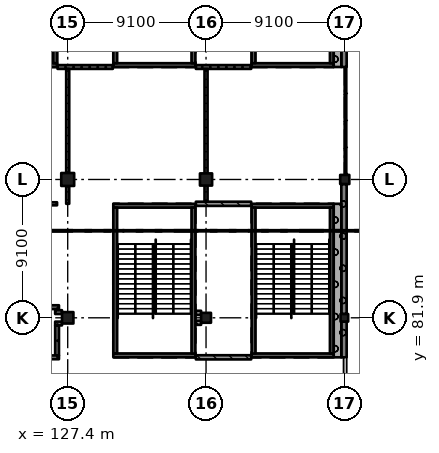
"""IFC4 building model, lengths in metres.
Left out: names, types, materials, properties, quantities, classifications, styles, units other than length and angle.
Written with IfcOpenShell. Run it as: python <this file> out.ifc"""

import sys

from ifc_helpers import new_model, si_unit, direction, frame, frame_2d, origin, origin_2d, place, context, subcontext, project, spatial, rectangle, extrude, element, fill, save


model = new_model("IFC4")
c1 = context("Model", 3, precision=1e-05, world=origin(), true_north=direction((0.0, 1.0)))
c2 = subcontext(c1, "Body", "Model", "MODEL_VIEW")
j1 = project(units=[si_unit("LENGTHUNIT", "METRE"), si_unit("PLANEANGLEUNIT", "RADIAN")], contexts=[c1])
p1 = place(None, origin())
s1 = spatial("IfcSite", under=j1, at=p1, CompositionType="ELEMENT")
p2 = place(p1, origin())
s2 = spatial("IfcBuilding", under=s1, at=p2, CompositionType="ELEMENT")
p3 = place(p2, frame((0.0, 0.0, 6.37)))
s3 = spatial("IfcBuildingStorey", under=s2, at=p3, CompositionType="ELEMENT", Elevation=6.37)
p4 = place(p3, frame((127.4, 81.9, 0.0), z_axis=(0.0, 0.0, 1.0), x_axis=(1.0, 0.0, 0.0)))
e1 = element("IfcColumn", 1, at=p4, inside=s3, PredefinedType="COLUMN", context=c2, shape_type="SweptSolid", body=[
    extrude(rectangle(XDim=0.75, YDim=0.75, at=origin_2d()), origin(), (0.0, 0.0, 1.0), 4.55),
])
p5 = place(p3, frame((127.4, 91.0, 0.0), z_axis=(0.0, 0.0, 1.0), x_axis=(1.0, 0.0, 0.0)))
e2 = element("IfcColumn", 2, at=p5, inside=s3, PredefinedType="COLUMN", context=c2, shape_type="SweptSolid", body=[
    extrude(rectangle(XDim=0.85, YDim=0.85, at=origin_2d()), origin(), (0.0, 0.0, 1.0), 4.55),
])
p6 = place(p3, frame((136.5, 81.9, 0.0), z_axis=(0.0, 0.0, 1.0), x_axis=(1.0, 0.0, 0.0)))
e3 = element("IfcColumn", 3, at=p6, inside=s3, PredefinedType="COLUMN", context=c2, shape_type="SweptSolid", body=[
    extrude(rectangle(XDim=0.65, YDim=0.65, at=origin_2d()), origin(), (0.0, 0.0, 1.0), 4.55),
])
p7 = place(p3, frame((136.5, 91.0, 0.0), z_axis=(0.0, 0.0, 1.0), x_axis=(1.0, 0.0, 0.0)))
e4 = element("IfcColumn", 4, at=p7, inside=s3, PredefinedType="COLUMN", context=c2, shape_type="SweptSolid", body=[
    extrude(rectangle(XDim=0.8, YDim=0.8, at=origin_2d()), origin(), (0.0, 0.0, 1.0), 4.55),
])
p8 = place(p3, frame((145.6, 81.9, 0.0), z_axis=(0.0, 0.0, 1.0), x_axis=(1.0, 0.0, 0.0)))
e5 = element("IfcColumn", 5, at=p8, inside=s3, PredefinedType="COLUMN", context=c2, shape_type="SweptSolid", body=[
    extrude(rectangle(XDim=0.5, YDim=0.5, at=origin_2d()), origin(), (0.0, 0.0, 1.0), 4.55),
])
p9 = place(p3, frame((145.625, 91.0, 0.0), z_axis=(0.0, 0.0, 1.0), x_axis=(1.0, 0.0, 0.0)))
e6 = element("IfcColumn", 6, at=p9, inside=s3, PredefinedType="COLUMN", context=c2, shape_type="SweptSolid", body=[
    extrude(rectangle(XDim=0.6, YDim=0.6, at=origin_2d()), origin(), (0.0, 0.0, 1.0), 4.55),
])
p10 = place(p3, frame((144.9, 98.525, 0.0), z_axis=(0.0, 0.0, 1.0), x_axis=(-1.0, 0.0, 0.0)))
e7 = element("IfcWall", 7, at=p10, inside=s3, PredefinedType="SHEAR", context=c2, shape_type="SweptSolid", body=[
    extrude(rectangle(XDim=5.4, YDim=0.25, at=frame_2d((2.7, 0.0))), origin(), (0.0, 0.0, 1.0), 4.55),
])
p11 = place(p10, frame((1.5, 0.0, 0.0)))
e8 = element("IfcOpeningElement", 8, at=p11, cuts=e7, PredefinedType="OPENING", context=c2, shape_type="SweptSolid", body=[
    extrude(rectangle(XDim=2.4, YDim=2.1, at=frame_2d((1.2, 1.05))), frame((0.0, 0.135, 0.0), z_axis=(0.0, -1.0, 0.0), x_axis=(1.0, 0.0, 0.0)), (0.0, 0.0, 1.0), 0.27),
])
for number, where, z_axis, x_axis in (
    (9, (139.625, 108.25, 0.0), (0.0, 0.0, 1.0), (0.0, -1.0, 0.0)),
    (10, (144.775, 108.25, 0.0), (0.0, 0.0, 1.0), (0.0, -1.0, 0.0)),
):
    element("IfcWall", number, at=place(p3, frame(where, z_axis=z_axis, x_axis=x_axis)), inside=s3, PredefinedType="SHEAR", context=c2, shape_type="SweptSolid", body=[
        extrude(rectangle(XDim=9.6, YDim=0.25, at=frame_2d((4.8, 0.0))), origin(), (0.0, 0.0, 1.0), 4.55),
    ])
p12 = place(p3, frame((135.8, 98.525, 0.0), z_axis=(0.0, 0.0, 1.0), x_axis=(-1.0, 0.0, 0.0)))
e11 = element("IfcWall", 11, at=p12, inside=s3, PredefinedType="SHEAR", context=c2, shape_type="SweptSolid", body=[
    extrude(rectangle(XDim=5.4, YDim=0.25, at=frame_2d((2.7, 0.0))), origin(), (0.0, 0.0, 1.0), 4.55),
])
p13 = place(p12, frame((1.5, 0.0, 0.0)))
e12 = element("IfcOpeningElement", 12, at=p13, cuts=e11, PredefinedType="OPENING", context=c2, shape_type="SweptSolid", body=[
    extrude(rectangle(XDim=2.4, YDim=2.1, at=frame_2d((1.2, 1.05))), frame((0.0, 0.135, 0.0), z_axis=(0.0, -1.0, 0.0), x_axis=(1.0, 0.0, 0.0)), (0.0, 0.0, 1.0), 0.27),
])
for number, where, z_axis, x_axis in (
    (13, (130.525, 108.25, 0.0), (0.0, 0.0, 1.0), (0.0, -1.0, 0.0)),
    (14, (135.675, 108.25, 0.0), (0.0, 0.0, 1.0), (0.0, -1.0, 0.0)),
):
    element("IfcWall", number, at=place(p3, frame(where, z_axis=z_axis, x_axis=x_axis)), inside=s3, PredefinedType="SHEAR", context=c2, shape_type="SweptSolid", body=[
        extrude(rectangle(XDim=9.6, YDim=0.25, at=frame_2d((4.8, 0.0))), origin(), (0.0, 0.0, 1.0), 4.55),
    ])
p14 = place(p3, frame((126.7, 98.525, 0.0), z_axis=(0.0, 0.0, 1.0), x_axis=(-1.0, 0.0, 0.0)))
e15 = element("IfcWall", 15, at=p14, inside=s3, PredefinedType="SHEAR", context=c2, shape_type="SweptSolid", body=[
    extrude(rectangle(XDim=5.4, YDim=0.25, at=frame_2d((2.7, 0.0))), origin(), (0.0, 0.0, 1.0), 4.55),
])
p15 = place(p14, frame((1.5, 0.0, 0.0)))
e16 = element("IfcOpeningElement", 16, at=p15, cuts=e15, PredefinedType="OPENING", context=c2, shape_type="SweptSolid", body=[
    extrude(rectangle(XDim=2.4, YDim=2.1, at=frame_2d((1.2, 1.05))), frame((0.0, 0.135, 0.0), z_axis=(0.0, -1.0, 0.0), x_axis=(1.0, 0.0, 0.0)), (0.0, 0.0, 1.0), 0.27),
])
p16 = place(p3, frame((126.575, 108.25, 0.0), z_axis=(0.0, 0.0, 1.0), x_axis=(0.0, -1.0, 0.0)))
e17 = element("IfcWall", 17, at=p16, inside=s3, PredefinedType="SHEAR", context=c2, shape_type="SweptSolid", body=[
    extrude(rectangle(XDim=9.6, YDim=0.25, at=frame_2d((4.8, 0.0))), origin(), (0.0, 0.0, 1.0), 4.55),
])
p17 = place(p3, frame((144.9, 79.425, 0.0), z_axis=(0.0, 0.0, 1.0), x_axis=(-1.0, 0.0, 0.0)))
e18 = element("IfcWall", 18, at=p17, inside=s3, PredefinedType="SHEAR", context=c2, shape_type="SweptSolid", body=[
    extrude(rectangle(XDim=5.4, YDim=0.25, at=frame_2d((2.7, 0.0))), origin(), (0.0, 0.0, 1.0), 4.55),
])
p18 = place(p3, frame((144.9, 89.275, 0.0), z_axis=(0.0, 0.0, 1.0), x_axis=(-1.0, 0.0, 0.0)))
e19 = element("IfcWall", 19, at=p18, inside=s3, PredefinedType="SHEAR", context=c2, shape_type="SweptSolid", body=[
    extrude(rectangle(XDim=5.4, YDim=0.25, at=frame_2d((2.7, 0.0))), origin(), (0.0, 0.0, 1.0), 4.55),
])
p19 = place(p18, frame((1.5, 0.0, 0.0)))
e20 = element("IfcOpeningElement", 20, at=p19, cuts=e19, PredefinedType="OPENING", context=c2, shape_type="SweptSolid", body=[
    extrude(rectangle(XDim=2.4, YDim=2.1, at=frame_2d((1.2, 1.05))), frame((0.0, 0.135, 0.0), z_axis=(0.0, -1.0, 0.0), x_axis=(1.0, 0.0, 0.0)), (0.0, 0.0, 1.0), 0.27),
])
for number, where, z_axis, x_axis in (
    (21, (139.625, 89.15, 0.0), (0.0, 0.0, 1.0), (0.0, -1.0, 0.0)),
    (22, (144.775, 89.15, 0.0), (0.0, 0.0, 1.0), (0.0, -1.0, 0.0)),
):
    element("IfcWall", number, at=place(p3, frame(where, z_axis=z_axis, x_axis=x_axis)), inside=s3, PredefinedType="SHEAR", context=c2, shape_type="SweptSolid", body=[
        extrude(rectangle(XDim=9.6, YDim=0.25, at=frame_2d((4.8, 0.0))), origin(), (0.0, 0.0, 1.0), 4.55),
    ])
p20 = place(p3, frame((135.8, 79.425, 0.0), z_axis=(0.0, 0.0, 1.0), x_axis=(-1.0, 0.0, 0.0)))
e23 = element("IfcWall", 23, at=p20, inside=s3, PredefinedType="SHEAR", context=c2, shape_type="SweptSolid", body=[
    extrude(rectangle(XDim=5.4, YDim=0.25, at=frame_2d((2.7, 0.0))), origin(), (0.0, 0.0, 1.0), 4.55),
])
p21 = place(p3, frame((135.8, 89.275, 0.0), z_axis=(0.0, 0.0, 1.0), x_axis=(-1.0, 0.0, 0.0)))
e24 = element("IfcWall", 24, at=p21, inside=s3, PredefinedType="SHEAR", context=c2, shape_type="SweptSolid", body=[
    extrude(rectangle(XDim=5.4, YDim=0.25, at=frame_2d((2.7, 0.0))), origin(), (0.0, 0.0, 1.0), 4.55),
])
p22 = place(p21, frame((1.5, 0.0, 0.0)))
e25 = element("IfcOpeningElement", 25, at=p22, cuts=e24, PredefinedType="OPENING", context=c2, shape_type="SweptSolid", body=[
    extrude(rectangle(XDim=2.4, YDim=2.1, at=frame_2d((1.2, 1.05))), frame((0.0, 0.135, 0.0), z_axis=(0.0, -1.0, 0.0), x_axis=(1.0, 0.0, 0.0)), (0.0, 0.0, 1.0), 0.27),
])
for number, where, z_axis, x_axis in (
    (26, (130.525, 89.15, 0.0), (0.0, 0.0, 1.0), (0.0, -1.0, 0.0)),
    (27, (135.675, 89.15, 0.0), (0.0, 0.0, 1.0), (0.0, -1.0, 0.0)),
):
    element("IfcWall", number, at=place(p3, frame(where, z_axis=z_axis, x_axis=x_axis)), inside=s3, PredefinedType="SHEAR", context=c2, shape_type="SweptSolid", body=[
        extrude(rectangle(XDim=9.6, YDim=0.25, at=frame_2d((4.8, 0.0))), origin(), (0.0, 0.0, 1.0), 4.55),
    ])
p23 = place(p3, frame((145.575, 79.3, 0.0), z_axis=(0.0, 0.0, 1.0), x_axis=(0.0, 1.0, 0.0)))
e28 = element("IfcWall", 28, at=p23, inside=s3, PredefinedType="SOLIDWALL", context=c2, shape_type="SweptSolid", body=[
    extrude(rectangle(XDim=2.35, YDim=0.35, at=frame_2d((1.175, 0.0))), origin(), (0.0, 0.0, 1.0), 3.5),
])
p24 = place(p3, frame((145.575, 82.15, 0.0), z_axis=(0.0, 0.0, 1.0), x_axis=(0.0, 1.0, 0.0)))
e29 = element("IfcWall", 29, at=p24, inside=s3, PredefinedType="SOLIDWALL", context=c2, shape_type="SweptSolid", body=[
    extrude(rectangle(XDim=8.55, YDim=0.35, at=frame_2d((4.275, 0.0))), origin(), (0.0, 0.0, 1.0), 3.5),
])
p25 = place(p3, frame((145.575, 98.4, 0.0), z_axis=(0.0, 0.0, 1.0), x_axis=(0.0, 1.0, 0.0)))
e30 = element("IfcWall", 30, at=p25, inside=s3, PredefinedType="SOLIDWALL", context=c2, shape_type="SweptSolid", body=[
    extrude(rectangle(XDim=1.45, YDim=0.35, at=frame_2d((0.725, 0.0))), origin(), (0.0, 0.0, 1.0), 3.5),
])
p26 = place(p3, frame((145.15, 98.4, 0.0), z_axis=(0.0, 0.0, 1.0), x_axis=(0.0, 1.0, 0.0)))
e31 = element("IfcWall", 31, at=p26, inside=s3, PredefinedType="SOLIDWALL", context=c2, shape_type="SweptSolid", body=[
    extrude(rectangle(XDim=10.1, YDim=0.5, at=frame_2d((5.05, 0.0))), origin(), (0.0, 0.0, 1.0), 4.55),
])
p27 = place(p3, frame((145.15, 79.3, 0.0), z_axis=(0.0, 0.0, 1.0), x_axis=(0.0, 1.0, 0.0)))
e32 = element("IfcWall", 32, at=p27, inside=s3, PredefinedType="SOLIDWALL", context=c2, shape_type="SweptSolid", body=[
    extrude(rectangle(XDim=10.1, YDim=0.5, at=frame_2d((5.05, 0.0))), origin(), (0.0, 0.0, 1.0), 4.55),
])
p28 = place(p3, frame((126.13, 82.6, 0.0), z_axis=(0.0, 0.0, 1.0), x_axis=(1.0, 0.0, 0.0)))
e33 = element("IfcWall", 33, at=p28, inside=s3, PredefinedType="SOLIDWALL", context=c2, shape_type="SweptSolid", body=[
    extrude(rectangle(XDim=0.695, YDim=0.25, at=frame_2d((0.348, 0.0))), origin(), (0.0, 0.0, 1.0), 4.25),
])
p29 = place(p3, frame((126.575, 81.525, 0.0), z_axis=(0.0, 0.0, 1.0), x_axis=(1.0, 0.0, 0.0)))
e34 = element("IfcWall", 34, at=p29, inside=s3, PredefinedType="SOLIDWALL", context=c2, shape_type="SweptSolid", body=[
    extrude(rectangle(XDim=0.45, YDim=0.25, at=frame_2d((0.225, 0.0))), origin(), (0.0, 0.0, 1.0), 4.25),
])
p30 = place(p3, frame((126.7, 79.425, 0.0), z_axis=(0.0, 0.0, 1.0), x_axis=(0.0, 1.0, 0.0)))
e35 = element("IfcWall", 35, at=p30, inside=s3, PredefinedType="SOLIDWALL", context=c2, shape_type="SweptSolid", body=[
    extrude(rectangle(XDim=1.975, YDim=0.25, at=frame_2d((0.987, 0.0))), origin(), (0.0, 0.0, 1.0), 4.25),
])
p31 = place(p3, frame((126.7, 89.4, 0.0), z_axis=(0.0, 0.0, 1.0), x_axis=(-1.0, 0.0, 0.0)))
e36 = element("IfcWall", 36, at=p31, inside=s3, PredefinedType="PARTITIONING", context=c2, shape_type="SweptSolid", body=[
    extrude(rectangle(XDim=5.4, YDim=0.2, at=frame_2d((2.7, 0.0))), origin(), (0.0, 0.0, 1.0), 4.25),
])
p32 = place(p31, frame((1.85, 0.0, 0.0)))
e37 = element("IfcOpeningElement", 37, at=p32, cuts=e36, PredefinedType="OPENING", context=c2, shape_type="SweptSolid", body=[
    extrude(rectangle(XDim=1.8, YDim=2.4, at=frame_2d((0.9, 1.2))), frame((0.0, 0.11, 0.0), z_axis=(0.0, -1.0, 0.0), x_axis=(1.0, 0.0, 0.0)), (0.0, 0.0, 1.0), 0.22),
])
p33 = place(p3, frame((126.73, 98.4, 0.0), z_axis=(0.0, 0.0, 1.0), x_axis=(1.0, 0.0, 0.0)))
e38 = element("IfcWall", 38, at=p33, inside=s3, PredefinedType="SOLIDWALL", context=c2, shape_type="SweptSolid", body=[
    extrude(rectangle(XDim=3.64, YDim=0.25, at=frame_2d((1.82, 0.0))), origin(), (0.0, 0.0, 1.0), 4.25),
])
p34 = place(p33, frame((1.72, 0.0, 0.0)))
e39 = element("IfcOpeningElement", 39, at=p34, cuts=e38, PredefinedType="OPENING", context=c2, shape_type="SweptSolid", body=[
    extrude(rectangle(XDim=0.8, YDim=2.1, at=frame_2d((0.4, 1.05))), frame((0.0, 0.135, 0.0), z_axis=(0.0, -1.0, 0.0), x_axis=(1.0, 0.0, 0.0)), (0.0, 0.0, 1.0), 0.27),
])
p35 = place(p3, frame((126.825, 79.3, 0.0), z_axis=(0.0, 0.0, 1.0), x_axis=(-1.0, 0.0, 0.0)))
e40 = element("IfcWall", 40, at=p35, inside=s3, PredefinedType="SOLIDWALL", context=c2, shape_type="SweptSolid", body=[
    extrude(rectangle(XDim=5.495, YDim=0.25, at=frame_2d((2.748, 0.0))), origin(), (0.0, 0.0, 1.0), 4.25),
])
p36 = place(p3, frame((127.025, 82.275, 0.0), z_axis=(0.0, 0.0, 1.0), x_axis=(-1.0, 0.0, 0.0)))
e41 = element("IfcWall", 41, at=p36, inside=s3, PredefinedType="SOLIDWALL", context=c2, shape_type="SweptSolid", body=[
    extrude(rectangle(XDim=0.45, YDim=0.25, at=frame_2d((0.225, 0.0))), origin(), (0.0, 0.0, 1.0), 4.25),
])
p37 = place(p3, frame((127.4, 89.4, 0.0), z_axis=(0.0, 0.0, 1.0), x_axis=(0.0, 1.0, 0.0)))
e42 = element("IfcWall", 42, at=p37, inside=s3, PredefinedType="PARTITIONING", context=c2, shape_type="SweptSolid", body=[
    extrude(rectangle(XDim=1.175, YDim=0.2, at=frame_2d((0.587, 0.0))), origin(), (0.0, 0.0, 1.0), 3.55),
])
p38 = place(p3, frame((127.4, 91.425, 0.0), z_axis=(0.0, 0.0, 1.0), x_axis=(0.0, 1.0, 0.0)))
e43 = element("IfcWall", 43, at=p38, inside=s3, PredefinedType="PARTITIONING", context=c2, shape_type="SweptSolid", body=[
    extrude(rectangle(XDim=6.85, YDim=0.2, at=frame_2d((3.425, 0.0))), origin(), (0.0, 0.0, 1.0), 3.55),
])
p39 = place(p38, frame((0.85, 0.0, 0.0)))
e44 = element("IfcOpeningElement", 44, at=p39, cuts=e43, PredefinedType="OPENING", context=c2, shape_type="SweptSolid", body=[
    extrude(rectangle(XDim=1.8, YDim=2.4, at=frame_2d((0.9, 1.2))), frame((0.0, 0.11, 0.0), z_axis=(0.0, -1.0, 0.0), x_axis=(1.0, 0.0, 0.0)), (0.0, 0.0, 1.0), 0.22),
])
p40 = place(p38, frame((4.25, 0.0, 0.0)))
e45 = element("IfcOpeningElement", 45, at=p40, cuts=e43, PredefinedType="OPENING", context=c2, shape_type="SweptSolid", body=[
    extrude(rectangle(XDim=1.8, YDim=2.4, at=frame_2d((0.9, 1.2))), frame((0.0, 0.11, 0.0), z_axis=(0.0, -1.0, 0.0), x_axis=(1.0, 0.0, 0.0)), (0.0, 0.0, 1.0), 0.22),
])
p41 = place(p3, frame((135.83, 81.575, 0.0), z_axis=(0.0, 0.0, 1.0), x_axis=(1.0, 0.0, 0.0)))
e46 = element("IfcWall", 46, at=p41, inside=s3, PredefinedType="SOLIDWALL", context=c2, shape_type="SweptSolid", body=[
    extrude(rectangle(XDim=0.345, YDim=0.275, at=frame_2d((0.172, 0.0))), origin(), (0.0, 0.0, 1.0), 4.25),
])
p42 = place(p3, frame((135.83, 98.4, 0.0), z_axis=(0.0, 0.0, 1.0), x_axis=(1.0, 0.0, 0.0)))
e47 = element("IfcWall", 47, at=p42, inside=s3, PredefinedType="SOLIDWALL", context=c2, shape_type="SweptSolid", body=[
    extrude(rectangle(XDim=3.64, YDim=0.25, at=frame_2d((1.82, 0.0))), origin(), (0.0, 0.0, 1.0), 4.25),
])
p43 = place(p42, frame((1.62, 0.0, 0.0)))
e48 = element("IfcOpeningElement", 48, at=p43, cuts=e47, PredefinedType="OPENING", context=c2, shape_type="SweptSolid", body=[
    extrude(rectangle(XDim=1.0, YDim=2.1, at=frame_2d((0.5, 1.05))), frame((0.0, 0.135, 0.0), z_axis=(0.0, -1.0, 0.0), x_axis=(1.0, 0.0, 0.0)), (0.0, 0.0, 1.0), 0.27),
])
p44 = place(p3, frame((136.175, 82.225, 0.0), z_axis=(0.0, 0.0, 1.0), x_axis=(-1.0, 0.0, 0.0)))
e49 = element("IfcWall", 49, at=p44, inside=s3, PredefinedType="SOLIDWALL", context=c2, shape_type="SweptSolid", body=[
    extrude(rectangle(XDim=0.345, YDim=0.275, at=frame_2d((0.172, 0.0))), origin(), (0.0, 0.0, 1.0), 4.25),
])
p45 = place(p3, frame((135.83, 89.4, 0.0), z_axis=(0.0, 0.0, 1.0), x_axis=(1.0, 0.0, 0.0)))
e50 = element("IfcWall", 50, at=p45, inside=s3, PredefinedType="SOLIDWALL", context=c2, shape_type="SweptSolid", body=[
    extrude(rectangle(XDim=3.64, YDim=0.275, at=frame_2d((1.82, 0.0))), origin(), (0.0, 0.0, 1.0), 4.25),
])
p46 = place(p45, frame((1.59, 0.0, 0.0)))
e51 = element("IfcOpeningElement", 51, at=p46, cuts=e50, PredefinedType="OPENING", context=c2, shape_type="SweptSolid", body=[
    extrude(rectangle(XDim=1.2, YDim=2.4, at=frame_2d((0.6, 1.2))), frame((0.0, 0.147, 0.0), z_axis=(0.0, -1.0, 0.0), x_axis=(1.0, 0.0, 0.0)), (0.0, 0.0, 1.0), 0.295),
])
p47 = place(p3, frame((136.5, 89.538, 0.0), z_axis=(0.0, 0.0, 1.0), x_axis=(0.0, 1.0, 0.0)))
e52 = element("IfcWall", 52, at=p47, inside=s3, PredefinedType="PARTITIONING", context=c2, shape_type="SweptSolid", body=[
    extrude(rectangle(XDim=1.062, YDim=0.2, at=frame_2d((0.531, 0.0))), origin(), (0.0, 0.0, 1.0), 3.55),
])
p48 = place(p3, frame((136.5, 91.4, 0.0), z_axis=(0.0, 0.0, 1.0), x_axis=(0.0, 1.0, 0.0)))
e53 = element("IfcWall", 53, at=p48, inside=s3, PredefinedType="PARTITIONING", context=c2, shape_type="SweptSolid", body=[
    extrude(rectangle(XDim=6.875, YDim=0.2, at=frame_2d((3.438, 0.0))), origin(), (0.0, 0.0, 1.0), 3.55),
])
p49 = place(p48, frame((0.85, 0.0, 0.0)))
e54 = element("IfcOpeningElement", 54, at=p49, cuts=e53, PredefinedType="OPENING", context=c2, shape_type="SweptSolid", body=[
    extrude(rectangle(XDim=1.8, YDim=2.4, at=frame_2d((0.9, 1.2))), frame((0.0, 0.11, 0.0), z_axis=(0.0, -1.0, 0.0), x_axis=(1.0, 0.0, 0.0)), (0.0, 0.0, 1.0), 0.22),
])
p50 = place(p48, frame((4.25, 0.0, 0.0)))
e55 = element("IfcOpeningElement", 55, at=p50, cuts=e53, PredefinedType="OPENING", context=c2, shape_type="SweptSolid", body=[
    extrude(rectangle(XDim=1.8, YDim=2.4, at=frame_2d((0.9, 1.2))), frame((0.0, 0.11, 0.0), z_axis=(0.0, -1.0, 0.0), x_axis=(1.0, 0.0, 0.0)), (0.0, 0.0, 1.0), 0.22),
])
p51 = place(p3, frame((139.47, 79.3, 0.0), z_axis=(0.0, 0.0, 1.0), x_axis=(-1.0, 0.0, 0.0)))
e56 = element("IfcWall", 56, at=p51, inside=s3, PredefinedType="SOLIDWALL", context=c2, shape_type="SweptSolid", body=[
    extrude(rectangle(XDim=3.64, YDim=0.275, at=frame_2d((1.82, 0.0))), origin(), (0.0, 0.0, 1.0), 4.25),
])
p52 = place(p46, origin())
e57 = element("IfcDoor", 57, at=p52, inside=s3, OperationType="SINGLE_SWING_RIGHT", PredefinedType="DOOR", context=c2, shape_type="SweptSolid", body=[
    extrude(rectangle(XDim=1.2, YDim=2.4, at=frame_2d((0.6, 1.2))), frame((0.0, 0.025, 0.0), z_axis=(0.0, -1.0, 0.0), x_axis=(1.0, 0.0, 0.0)), (0.0, 0.0, 1.0), 0.05),
])
fill(e51, e57)
p53 = place(p43, origin())
e58 = element("IfcDoor", 58, at=p53, inside=s3, OperationType="SINGLE_SWING_RIGHT", PredefinedType="DOOR", context=c2, shape_type="SweptSolid", body=[
    extrude(rectangle(XDim=1.0, YDim=2.1, at=frame_2d((0.5, 1.05))), frame((0.0, 0.025, 0.0), z_axis=(0.0, -1.0, 0.0), x_axis=(1.0, 0.0, 0.0)), (0.0, 0.0, 1.0), 0.05),
])
fill(e48, e58)
p54 = place(p34, origin())
e59 = element("IfcDoor", 59, at=p54, inside=s3, OperationType="SINGLE_SWING_RIGHT", PredefinedType="DOOR", context=c2, shape_type="SweptSolid", body=[
    extrude(rectangle(XDim=0.8, YDim=2.1, at=frame_2d((0.4, 1.05))), frame((0.0, 0.025, 0.0), z_axis=(0.0, -1.0, 0.0), x_axis=(1.0, 0.0, 0.0)), (0.0, 0.0, 1.0), 0.05),
])
fill(e39, e59)
p55 = place(p49, origin())
e60 = element("IfcDoor", 60, at=p55, inside=s3, OperationType="DOUBLE_DOOR_SINGLE_SWING", PredefinedType="DOOR", context=c2, shape_type="SweptSolid", body=[
    extrude(rectangle(XDim=1.8, YDim=2.4, at=frame_2d((0.9, 1.2))), frame((0.0, 0.025, 0.0), z_axis=(0.0, -1.0, 0.0), x_axis=(1.0, 0.0, 0.0)), (0.0, 0.0, 1.0), 0.05),
])
fill(e54, e60)
p56 = place(p50, origin())
e61 = element("IfcDoor", 61, at=p56, inside=s3, OperationType="DOUBLE_DOOR_SINGLE_SWING", PredefinedType="DOOR", context=c2, shape_type="SweptSolid", body=[
    extrude(rectangle(XDim=1.8, YDim=2.4, at=frame_2d((0.9, 1.2))), frame((0.0, 0.025, 0.0), z_axis=(0.0, -1.0, 0.0), x_axis=(1.0, 0.0, 0.0)), (0.0, 0.0, 1.0), 0.05),
])
fill(e55, e61)
p57 = place(p39, origin())
e62 = element("IfcDoor", 62, at=p57, inside=s3, OperationType="DOUBLE_DOOR_SINGLE_SWING", PredefinedType="DOOR", context=c2, shape_type="SweptSolid", body=[
    extrude(rectangle(XDim=1.8, YDim=2.4, at=frame_2d((0.9, 1.2))), frame((0.0, 0.025, 0.0), z_axis=(0.0, -1.0, 0.0), x_axis=(1.0, 0.0, 0.0)), (0.0, 0.0, 1.0), 0.05),
])
fill(e44, e62)
p58 = place(p40, origin())
e63 = element("IfcDoor", 63, at=p58, inside=s3, OperationType="DOUBLE_DOOR_SINGLE_SWING", PredefinedType="DOOR", context=c2, shape_type="SweptSolid", body=[
    extrude(rectangle(XDim=1.8, YDim=2.4, at=frame_2d((0.9, 1.2))), frame((0.0, 0.025, 0.0), z_axis=(0.0, -1.0, 0.0), x_axis=(1.0, 0.0, 0.0)), (0.0, 0.0, 1.0), 0.05),
])
fill(e45, e63)
p59 = place(p11, origin())
e64 = element("IfcDoor", 64, at=p59, inside=s3, OperationType="DOUBLE_DOOR_SINGLE_SWING", PredefinedType="DOOR", context=c2, shape_type="SweptSolid", body=[
    extrude(rectangle(XDim=2.4, YDim=2.1, at=frame_2d((1.2, 1.05))), frame((0.0, 0.025, 0.0), z_axis=(0.0, -1.0, 0.0), x_axis=(1.0, 0.0, 0.0)), (0.0, 0.0, 1.0), 0.05),
])
fill(e8, e64)
p60 = place(p13, origin())
e65 = element("IfcDoor", 65, at=p60, inside=s3, OperationType="DOUBLE_DOOR_SINGLE_SWING", PredefinedType="DOOR", context=c2, shape_type="SweptSolid", body=[
    extrude(rectangle(XDim=2.4, YDim=2.1, at=frame_2d((1.2, 1.05))), frame((0.0, 0.025, 0.0), z_axis=(0.0, -1.0, 0.0), x_axis=(1.0, 0.0, 0.0)), (0.0, 0.0, 1.0), 0.05),
])
fill(e12, e65)
p61 = place(p19, origin())
e66 = element("IfcDoor", 66, at=p61, inside=s3, OperationType="DOUBLE_DOOR_SINGLE_SWING", PredefinedType="DOOR", context=c2, shape_type="SweptSolid", body=[
    extrude(rectangle(XDim=2.4, YDim=2.1, at=frame_2d((1.2, 1.05))), frame((0.0, 0.025, 0.0), z_axis=(0.0, -1.0, 0.0), x_axis=(1.0, 0.0, 0.0)), (0.0, 0.0, 1.0), 0.05),
])
fill(e20, e66)
p62 = place(p22, origin())
e67 = element("IfcDoor", 67, at=p62, inside=s3, OperationType="DOUBLE_DOOR_SINGLE_SWING", PredefinedType="DOOR", context=c2, shape_type="SweptSolid", body=[
    extrude(rectangle(XDim=2.4, YDim=2.1, at=frame_2d((1.2, 1.05))), frame((0.0, 0.025, 0.0), z_axis=(0.0, -1.0, 0.0), x_axis=(1.0, 0.0, 0.0)), (0.0, 0.0, 1.0), 0.05),
])
fill(e25, e67)
save(model, sys.argv[1])
